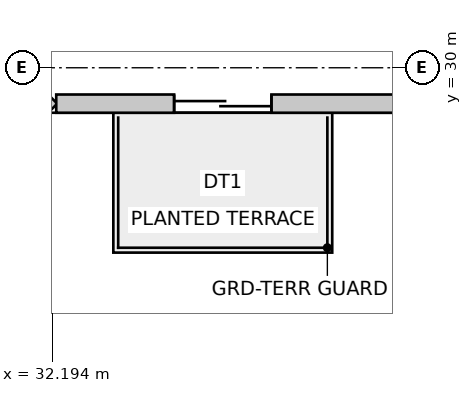
"""IFC4 building model, lengths in metres.
Left out: names, types, materials, properties, quantities, classifications, styles, units other than length and angle.
Written with IfcOpenShell. Run it as: python <this file> out.ifc"""

import sys

from ifc_helpers import new_model, si_unit, direction, frame, frame_2d, origin, place, context, subcontext, project, spatial, rectangle, extrude, source, transform, mapped, element, fill, save


model = new_model("IFC4")
c1 = context("Model", 3, precision=1e-05, world=origin(), true_north=direction((0.0, 1.0)))
c2 = subcontext(c1, "Body", "Model", "MODEL_VIEW")
j1 = project(units=[si_unit("LENGTHUNIT", "METRE"), si_unit("PLANEANGLEUNIT", "RADIAN")], contexts=[c1])
p1 = place(None, origin())
s1 = spatial("IfcSite", under=j1, at=p1, CompositionType="ELEMENT")
p2 = place(p1, origin())
s2 = spatial("IfcBuilding", under=s1, at=p2, CompositionType="ELEMENT")
p3 = place(p2, frame((0.0, 0.0, 43.0)))
s3 = spatial("IfcBuildingStorey", under=s2, at=p3, CompositionType="ELEMENT", Elevation=43.0)
p4 = place(p3, frame((30.116, 27.46, 0.0), z_axis=(0.0, 0.0, 1.0), x_axis=(0.707106781187, 0.707106781187, 0.0)))
e1 = element("IfcWall", 1, at=p4, inside=s3, PredefinedType="SOLIDWALL", context=c2, shape_type="SweptSolid", body=[
    extrude(rectangle(XDim=2.907, YDim=0.3, at=frame_2d((1.454, 0.0))), origin(), (0.0, 0.0, 1.0), 3.75),
])
m1 = source(origin(), c2, "Body", "SweptSolid", [
    extrude(rectangle(XDim=1.8, YDim=2.1, at=frame_2d((0.9, 1.05))), frame((0.0, 0.16, 0.0), z_axis=(0.0, -1.0, 0.0), x_axis=(1.0, 0.0, 0.0)), (0.0, 0.0, 1.0), 0.32),
])
p5 = place(p4, frame((0.554, 0.0, 0.85)))
e2 = element("IfcOpeningElement", 2, at=p5, cuts=e1, PredefinedType="OPENING", context=c2, shape_type="MappedRepresentation", body=[
    mapped(m1, transform((0.0, 0.0, 0.0), scale=1.0)),
])
p6 = place(p3, frame((32.261, 29.41, 0.0), z_axis=(0.0, 0.0, 1.0), x_axis=(1.0, 0.0, 0.0)))
e3 = element("IfcWall", 3, at=p6, inside=s3, PredefinedType="SOLIDWALL", context=c2, shape_type="SweptSolid", body=[
    extrude(rectangle(XDim=25.627, YDim=0.3, at=frame_2d((12.813, 0.0))), origin(), (0.0, 0.0, 1.0), 3.75),
])
m2 = source(origin(), c2, "Body", "SweptSolid", [
    extrude(rectangle(XDim=1.6, YDim=2.15, at=frame_2d((0.8, 1.075))), frame((0.0, 0.16, 0.0), z_axis=(0.0, -1.0, 0.0), x_axis=(1.0, 0.0, 0.0)), (0.0, 0.0, 1.0), 0.32),
])
p7 = place(p6, frame((1.939, 0.0, 0.0)))
e4 = element("IfcOpeningElement", 4, at=p7, cuts=e3, PredefinedType="OPENING", context=c2, shape_type="MappedRepresentation", body=[
    mapped(m2, transform((0.0, 0.0, 0.0), scale=1.0)),
])
m3 = source(origin(), c2, "Body", "SweptSolid", [
    extrude(rectangle(XDim=2.8, YDim=2.4, at=frame_2d((1.4, 1.2))), frame((0.0, 0.16, 0.0), z_axis=(0.0, -1.0, 0.0), x_axis=(1.0, 0.0, 0.0)), (0.0, 0.0, 1.0), 0.32),
])
p8 = place(p6, frame((6.0, 0.0, 0.85)))
e5 = element("IfcOpeningElement", 5, at=p8, cuts=e3, PredefinedType="OPENING", context=c2, shape_type="MappedRepresentation", body=[
    mapped(m3, transform((0.0, 0.0, 0.0), scale=1.0)),
])
m4 = source(origin(), c2, "Body", "SweptSolid", [
    extrude(rectangle(XDim=2.4, YDim=2.2, at=frame_2d((1.2, 1.1))), frame((0.0, 0.16, 0.0), z_axis=(0.0, -1.0, 0.0), x_axis=(1.0, 0.0, 0.0)), (0.0, 0.0, 1.0), 0.32),
])
p9 = place(p6, frame((13.363, 0.0, 0.85)))
e6 = element("IfcOpeningElement", 6, at=p9, cuts=e3, PredefinedType="OPENING", context=c2, shape_type="MappedRepresentation", body=[
    mapped(m4, transform((0.0, 0.0, 0.0), scale=1.0)),
])
p10 = place(p6, frame((20.326, 0.0, 0.85)))
e7 = element("IfcOpeningElement", 7, at=p10, cuts=e3, PredefinedType="OPENING", context=c2, shape_type="MappedRepresentation", body=[
    mapped(m3, transform((0.0, 0.0, 0.0), scale=1.0)),
])
m5 = source(origin(), c2, "Body", "SweptSolid", [
    extrude(rectangle(XDim=1.6, YDim=2.15, at=frame_2d((0.8, 1.075))), frame((0.0, 0.025, 0.0), z_axis=(0.0, -1.0, 0.0), x_axis=(1.0, 0.0, 0.0)), (0.0, 0.0, 1.0), 0.05),
])
p11 = place(p7, origin())
e8 = element("IfcDoor", 8, at=p11, inside=s3, OperationType="DOUBLE_DOOR_SLIDING", PredefinedType="DOOR", context=c2, shape_type="MappedRepresentation", body=[
    mapped(m5, transform((0.0, 0.0, 0.0), scale=1.0)),
])
fill(e4, e8)
save(model, sys.argv[1])
